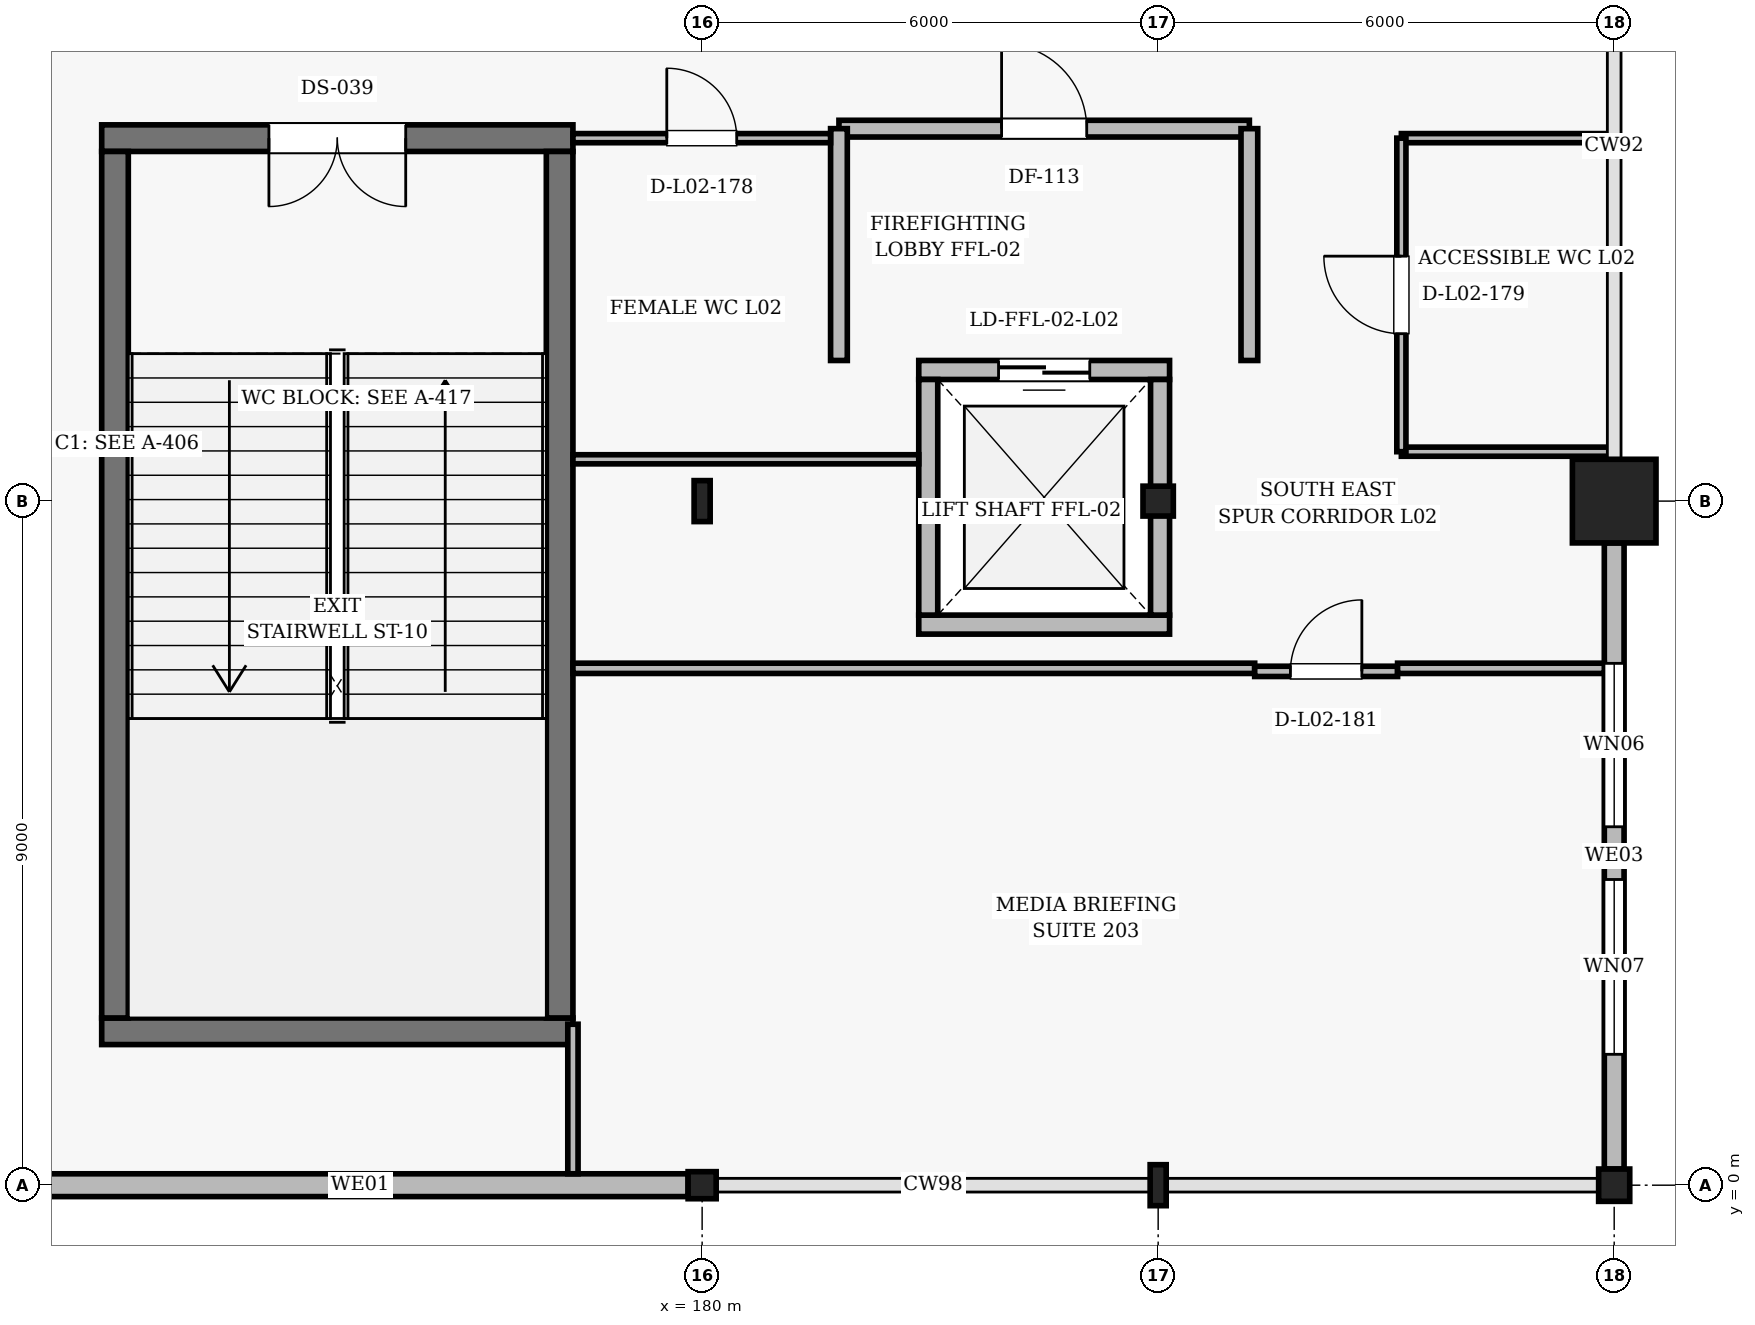
"""IFC4 building model, lengths in metres.
Left out: names, types, materials, properties, quantities, classifications, styles, units other than length and angle.
Written with IfcOpenShell. Run it as: python <this file> out.ifc"""

import sys

from ifc_helpers import new_model, si_unit, direction, frame, frame_2d, origin, origin_2d, place, context, subcontext, project, spatial, rectangle, i_section, extrude, element, fill, save


model = new_model("IFC4")
c1 = context("Model", 3, precision=1e-05, world=origin(), true_north=direction((0.0, 1.0)))
c2 = subcontext(c1, "Body", "Model", "MODEL_VIEW")
j1 = project(units=[si_unit("LENGTHUNIT", "METRE"), si_unit("PLANEANGLEUNIT", "RADIAN")], contexts=[c1])
p1 = place(None, origin())
s1 = spatial("IfcSite", under=j1, at=p1, CompositionType="ELEMENT")
p2 = place(p1, origin())
s2 = spatial("IfcBuilding", under=s1, at=p2, CompositionType="ELEMENT")
p3 = place(p2, frame((0.0, 0.0, 10.8)))
s3 = spatial("IfcBuildingStorey", under=s2, at=p3, CompositionType="ELEMENT", Elevation=10.8)
p4 = place(p3, frame((180.0, 0.0, 0.0), z_axis=(0.0, 0.0, 1.0), x_axis=(1.0, 0.0, 0.0)))
e1 = element("IfcColumn", 1, at=p4, inside=s3, PredefinedType="COLUMN", context=c2, shape_type="SweptSolid", body=[
    extrude(i_section(OverallWidth=0.369, OverallDepth=0.356, WebThickness=0.011, FlangeThickness=0.018, FilletRadius=0.015, at=origin_2d()), origin(), (0.0, 0.0, 1.0), 4.8),
])
for number, where, z_axis, x_axis in (
    (2, (180.0, 9.0, 0.0), (0.0, 0.0, 1.0), (1.0, 0.0, 0.0)),
    (3, (186.0, 0.0, 0.0), (0.0, 0.0, 1.0), (1.0, 0.0, 0.0)),
):
    element("IfcColumn", number, at=place(p3, frame(where, z_axis=z_axis, x_axis=x_axis)), inside=s3, PredefinedType="COLUMN", context=c2, shape_type="SweptSolid", body=[
        extrude(i_section(OverallWidth=0.211, OverallDepth=0.539, WebThickness=0.012, FlangeThickness=0.019, FilletRadius=0.014, at=origin_2d()), origin(), (0.0, 0.0, 1.0), 4.8),
    ])
p5 = place(p3, frame((186.0, 9.0, 0.0), z_axis=(0.0, 0.0, 1.0), x_axis=(1.0, 0.0, 0.0)))
e4 = element("IfcColumn", 4, at=p5, inside=s3, PredefinedType="COLUMN", context=c2, shape_type="SweptSolid", body=[
    extrude(i_section(OverallWidth=0.399, OverallDepth=0.393, WebThickness=0.023, FlangeThickness=0.037, FilletRadius=0.018, at=origin_2d()), origin(), (0.0, 0.0, 1.0), 4.8),
])
p6 = place(p3, frame((192.0, 0.0, 0.0), z_axis=(0.0, 0.0, 1.0), x_axis=(1.0, 0.0, 0.0)))
e5 = element("IfcColumn", 5, at=p6, inside=s3, PredefinedType="COLUMN", context=c2, shape_type="SweptSolid", body=[
    extrude(i_section(OverallWidth=0.409, OverallDepth=0.425, WebThickness=0.031, FlangeThickness=0.049, FilletRadius=0.02, at=origin_2d()), origin(), (0.0, 0.0, 1.0), 4.8),
])
p7 = place(p3, frame((192.0, 9.0, 0.0), z_axis=(0.0, 0.0, 1.0), x_axis=(1.0, 0.0, 0.0)))
e6 = element("IfcColumn", 6, at=p7, inside=s3, PredefinedType="COLUMN", context=c2, shape_type="SweptSolid", body=[
    extrude(rectangle(XDim=1.1, YDim=1.1, at=origin_2d()), origin(), (0.0, 0.0, 1.0), 4.8),
])
p8 = place(p3, frame((192.0, 8.45, 0.0), z_axis=(0.0, 0.0, 1.0), x_axis=(0.0, -1.0, 0.0)))
e7 = element("IfcWall", 7, at=p8, inside=s3, PredefinedType="SOLIDWALL", context=c2, shape_type="SweptSolid", body=[
    extrude(rectangle(XDim=8.238, YDim=0.26, at=frame_2d((4.119, 0.0))), origin(), (0.0, 0.0, 1.0), 4.285),
])
p9 = place(p8, frame((1.584, 0.0, 0.95)))
e8 = element("IfcOpeningElement", 8, at=p9, cuts=e7, PredefinedType="OPENING", context=c2, shape_type="SweptSolid", body=[
    extrude(rectangle(XDim=2.15, YDim=1.85, at=frame_2d((1.075, 0.925))), frame((0.0, 0.14, 0.0), z_axis=(0.0, -1.0, 0.0), x_axis=(1.0, 0.0, 0.0)), (0.0, 0.0, 1.0), 0.28),
])
p10 = place(p8, frame((4.428, 0.0, 0.95)))
e9 = element("IfcOpeningElement", 9, at=p10, cuts=e7, PredefinedType="OPENING", context=c2, shape_type="SweptSolid", body=[
    extrude(rectangle(XDim=2.3, YDim=1.9, at=frame_2d((1.15, 0.95))), frame((0.0, 0.14, 0.0), z_axis=(0.0, -1.0, 0.0), x_axis=(1.0, 0.0, 0.0)), (0.0, 0.0, 1.0), 0.28),
])
p11 = place(p3, frame((179.815, 0.0, 0.0), z_axis=(0.0, 0.0, 1.0), x_axis=(-1.0, 0.0, 0.0)))
e10 = element("IfcWall", 10, at=p11, inside=s3, PredefinedType="SOLIDWALL", context=c2, shape_type="SweptSolid", body=[
    extrude(rectangle(XDim=8.628, YDim=0.3, at=frame_2d((4.314, 0.0))), origin(), (0.0, 0.0, 1.0), 4.119),
])
p12 = place(p3, frame((172.1, 2.025, 0.0), z_axis=(0.0, 0.0, 1.0), x_axis=(1.0, 0.0, 0.0)))
e11 = element("IfcWall", 11, at=p12, inside=s3, PredefinedType="SHEAR", context=c2, shape_type="SweptSolid", body=[
    extrude(rectangle(XDim=6.2, YDim=0.35, at=frame_2d((3.1, 0.0))), origin(), (0.0, 0.0, 1.0), 4.6),
])
p13 = place(p3, frame((178.3, 13.775, 0.0), z_axis=(0.0, 0.0, 1.0), x_axis=(-1.0, 0.0, 0.0)))
e12 = element("IfcWall", 12, at=p13, inside=s3, PredefinedType="SHEAR", context=c2, shape_type="SweptSolid", body=[
    extrude(rectangle(XDim=6.2, YDim=0.35, at=frame_2d((3.1, 0.0))), origin(), (0.0, 0.0, 1.0), 4.6),
])
p14 = place(p13, frame((2.2, 0.0, 0.0)))
e13 = element("IfcOpeningElement", 13, at=p14, cuts=e12, PredefinedType="OPENING", context=c2, shape_type="SweptSolid", body=[
    extrude(rectangle(XDim=1.8, YDim=2.2, at=frame_2d((0.9, 1.1))), frame((0.0, 0.185, 0.0), z_axis=(0.0, -1.0, 0.0), x_axis=(1.0, 0.0, 0.0)), (0.0, 0.0, 1.0), 0.37),
])
for number, where, z_axis, x_axis in (
    (14, (172.275, 13.6, 0.0), (0.0, 0.0, 1.0), (0.0, -1.0, 0.0)),
    (15, (178.125, 2.2, 0.0), (0.0, 0.0, 1.0), (0.0, 1.0, 0.0)),
):
    element("IfcWall", number, at=place(p3, frame(where, z_axis=z_axis, x_axis=x_axis)), inside=s3, PredefinedType="SHEAR", context=c2, shape_type="SweptSolid", body=[
        extrude(rectangle(XDim=11.4, YDim=0.35, at=frame_2d((5.7, 0.0))), origin(), (0.0, 0.0, 1.0), 4.6),
    ])
p15 = place(p3, frame((182.85, 7.375, 0.0), z_axis=(0.0, 0.0, 1.0), x_axis=(1.0, 0.0, 0.0)))
e16 = element("IfcWall", 16, at=p15, inside=s3, PredefinedType="SOLIDWALL", context=c2, shape_type="SweptSolid", body=[
    extrude(rectangle(XDim=3.3, YDim=0.25, at=frame_2d((1.65, 0.0))), origin(), (0.0, 0.0, 1.0), 4.6),
])
p16 = place(p3, frame((186.15, 10.725, 0.0), z_axis=(0.0, 0.0, 1.0), x_axis=(-1.0, 0.0, 0.0)))
e17 = element("IfcWall", 17, at=p16, inside=s3, PredefinedType="SOLIDWALL", context=c2, shape_type="SweptSolid", body=[
    extrude(rectangle(XDim=3.3, YDim=0.25, at=frame_2d((1.65, 0.0))), origin(), (0.0, 0.0, 1.0), 4.6),
])
p17 = place(p16, frame((1.05, 0.0, 0.0)))
e18 = element("IfcOpeningElement", 18, at=p17, cuts=e17, PredefinedType="OPENING", context=c2, shape_type="SweptSolid", body=[
    extrude(rectangle(XDim=1.2, YDim=2.25, at=frame_2d((0.6, 1.125))), frame((0.0, 0.135, 0.0), z_axis=(0.0, -1.0, 0.0), x_axis=(1.0, 0.0, 0.0)), (0.0, 0.0, 1.0), 0.27),
])
for number, where, z_axis, x_axis in (
    (19, (182.975, 10.6, 0.0), (0.0, 0.0, 1.0), (0.0, -1.0, 0.0)),
    (20, (186.025, 7.5, 0.0), (0.0, 0.0, 1.0), (0.0, 1.0, 0.0)),
):
    element("IfcWall", number, at=place(p3, frame(where, z_axis=z_axis, x_axis=x_axis)), inside=s3, PredefinedType="SOLIDWALL", context=c2, shape_type="SweptSolid", body=[
        extrude(rectangle(XDim=3.1, YDim=0.25, at=frame_2d((1.55, 0.0))), origin(), (0.0, 0.0, 1.0), 4.6),
    ])
p18 = place(p3, frame((181.8, 13.9, 0.0), z_axis=(0.0, 0.0, 1.0), x_axis=(1.0, 0.0, 0.0)))
e21 = element("IfcWall", 21, at=p18, inside=s3, PredefinedType="SOLIDWALL", context=c2, shape_type="SweptSolid", body=[
    extrude(rectangle(XDim=5.4, YDim=0.22, at=frame_2d((2.7, 0.0))), origin(), (0.0, 0.0, 1.0), 4.6),
])
p19 = place(p18, frame((2.14, 0.0, 0.0)))
e22 = element("IfcOpeningElement", 22, at=p19, cuts=e21, PredefinedType="OPENING", context=c2, shape_type="SweptSolid", body=[
    extrude(rectangle(XDim=1.12, YDim=2.2, at=frame_2d((0.56, 1.1))), frame((0.0, 0.12, 0.0), z_axis=(0.0, -1.0, 0.0), x_axis=(1.0, 0.0, 0.0)), (0.0, 0.0, 1.0), 0.24),
])
for number, where, z_axis, x_axis in (
    (23, (181.8, 10.85, 0.0), (0.0, 0.0, 1.0), (0.0, 1.0, 0.0)),
    (24, (187.2, 10.85, 0.0), (0.0, 0.0, 1.0), (0.0, 1.0, 0.0)),
):
    element("IfcWall", number, at=place(p3, frame(where, z_axis=z_axis, x_axis=x_axis)), inside=s3, PredefinedType="SOLIDWALL", context=c2, shape_type="SweptSolid", body=[
        extrude(rectangle(XDim=3.05, YDim=0.22, at=frame_2d((1.525, 0.0))), origin(), (0.0, 0.0, 1.0), 4.6),
    ])
p20 = place(p3, frame((178.3, 13.775, 0.0), z_axis=(0.0, 0.0, 1.0), x_axis=(1.0, 0.0, 0.0)))
e25 = element("IfcWall", 25, at=p20, inside=s3, PredefinedType="PARTITIONING", context=c2, shape_type="SweptSolid", body=[
    extrude(rectangle(XDim=3.39, YDim=0.12, at=frame_2d((1.695, 0.0))), origin(), (0.0, 0.0, 1.0), 3.812),
])
p21 = place(p20, frame((1.235, 0.0, 0.0)))
e26 = element("IfcOpeningElement", 26, at=p21, cuts=e25, PredefinedType="OPENING", context=c2, shape_type="SweptSolid", body=[
    extrude(rectangle(XDim=0.92, YDim=2.12, at=frame_2d((0.46, 1.06))), frame((0.0, 0.07, 0.0), z_axis=(0.0, -1.0, 0.0), x_axis=(1.0, 0.0, 0.0)), (0.0, 0.0, 1.0), 0.14),
])
p22 = place(p3, frame((182.85, 9.55, 0.0), z_axis=(0.0, 0.0, 1.0), x_axis=(-1.0, 0.0, 0.0)))
e27 = element("IfcWall", 27, at=p22, inside=s3, PredefinedType="PARTITIONING", context=c2, shape_type="SweptSolid", body=[
    extrude(rectangle(XDim=4.55, YDim=0.12, at=frame_2d((2.275, 0.0))), origin(), (0.0, 0.0, 1.0), 3.812),
])
for number, where, z_axis, x_axis in (
    (28, (189.2, 13.775, 0.0), (0.0, 0.0, 1.0), (1.0, 0.0, 0.0)),
    (29, (191.988, 9.65, 0.0), (0.0, 0.0, 1.0), (-1.0, 0.0, 0.0)),
):
    element("IfcWall", number, at=place(p3, frame(where, z_axis=z_axis, x_axis=x_axis)), inside=s3, PredefinedType="PARTITIONING", context=c2, shape_type="SweptSolid", body=[
        extrude(rectangle(XDim=2.788, YDim=0.12, at=frame_2d((1.394, 0.0))), origin(), (0.0, 0.0, 1.0), 4.046),
    ])
p23 = place(p3, frame((189.2, 9.65, 0.0), z_axis=(0.0, 0.0, 1.0), x_axis=(0.0, 1.0, 0.0)))
e30 = element("IfcWall", 30, at=p23, inside=s3, PredefinedType="PARTITIONING", context=c2, shape_type="SweptSolid", body=[
    extrude(rectangle(XDim=4.125, YDim=0.12, at=frame_2d((2.062, 0.0))), origin(), (0.0, 0.0, 1.0), 4.6),
])
p24 = place(p23, frame((1.552, 0.0, 0.0)))
e31 = element("IfcOpeningElement", 31, at=p24, cuts=e30, PredefinedType="OPENING", context=c2, shape_type="SweptSolid", body=[
    extrude(rectangle(XDim=1.02, YDim=2.16, at=frame_2d((0.51, 1.08))), frame((0.0, 0.07, 0.0), z_axis=(0.0, -1.0, 0.0), x_axis=(1.0, 0.0, 0.0)), (0.0, 0.0, 1.0), 0.14),
])
p25 = place(p3, frame((178.3, 6.8, 0.0), z_axis=(0.0, 0.0, 1.0), x_axis=(1.0, 0.0, 0.0)))
e32 = element("IfcWall", 32, at=p25, inside=s3, PredefinedType="PARTITIONING", context=c2, shape_type="SweptSolid", body=[
    extrude(rectangle(XDim=8.97, YDim=0.135, at=frame_2d((4.485, 0.0))), origin(), (0.0, 0.0, 1.0), 3.89),
])
p26 = place(p3, frame((187.27, 6.76, 0.0), z_axis=(0.0, 0.0, 1.0), x_axis=(1.0, 0.0, 0.0)))
e33 = element("IfcWall", 33, at=p26, inside=s3, PredefinedType="PARTITIONING", context=c2, shape_type="SweptSolid", body=[
    extrude(rectangle(XDim=1.88, YDim=0.135, at=frame_2d((0.94, 0.0))), origin(), (0.0, 0.0, 1.0), 4.6),
])
p27 = place(p26, frame((0.47, 0.0, 0.0)))
e34 = element("IfcOpeningElement", 34, at=p27, cuts=e33, PredefinedType="OPENING", context=c2, shape_type="SweptSolid", body=[
    extrude(rectangle(XDim=0.94, YDim=2.15, at=frame_2d((0.47, 1.075))), frame((0.0, 0.078, 0.0), z_axis=(0.0, -1.0, 0.0), x_axis=(1.0, 0.0, 0.0)), (0.0, 0.0, 1.0), 0.155),
])
p28 = place(p3, frame((189.15, 6.8, 0.0), z_axis=(0.0, 0.0, 1.0), x_axis=(1.0, 0.0, 0.0)))
e35 = element("IfcWall", 35, at=p28, inside=s3, PredefinedType="PARTITIONING", context=c2, shape_type="SweptSolid", body=[
    extrude(rectangle(XDim=2.72, YDim=0.135, at=frame_2d((1.36, 0.0))), origin(), (0.0, 0.0, 1.0), 4.285),
])
p29 = place(p3, frame((178.3, 0.15, 0.0), z_axis=(0.0, 0.0, 1.0), x_axis=(0.0, 1.0, 0.0)))
e36 = element("IfcWall", 36, at=p29, inside=s3, PredefinedType="PARTITIONING", context=c2, shape_type="SweptSolid", body=[
    extrude(rectangle(XDim=1.968, YDim=0.135, at=frame_2d((0.984, 0.0))), origin(), (0.0, 0.0, 1.0), 4.119),
])
p30 = place(p9, origin())
e37 = element("IfcWindow", 37, at=p30, inside=s3, PartitioningType="SINGLE_PANEL", PredefinedType="WINDOW", context=c2, shape_type="SweptSolid", body=[
    extrude(rectangle(XDim=2.15, YDim=1.85, at=frame_2d((1.075, 0.925))), frame((0.0, 0.03, 0.0), z_axis=(0.0, -1.0, 0.0), x_axis=(1.0, 0.0, 0.0)), (0.0, 0.0, 1.0), 0.06),
])
fill(e8, e37)
p31 = place(p10, origin())
e38 = element("IfcWindow", 38, at=p31, inside=s3, PartitioningType="SINGLE_PANEL", PredefinedType="WINDOW", context=c2, shape_type="SweptSolid", body=[
    extrude(rectangle(XDim=2.3, YDim=1.9, at=frame_2d((1.15, 0.95))), frame((0.0, 0.03, 0.0), z_axis=(0.0, -1.0, 0.0), x_axis=(1.0, 0.0, 0.0)), (0.0, 0.0, 1.0), 0.06),
])
fill(e9, e38)
p32 = place(p14, origin())
e39 = element("IfcDoor", 39, at=p32, inside=s3, OperationType="DOUBLE_DOOR_SINGLE_SWING", PredefinedType="DOOR", context=c2, shape_type="SweptSolid", body=[
    extrude(rectangle(XDim=1.8, YDim=2.2, at=frame_2d((0.9, 1.1))), frame((0.0, 0.025, 0.0), z_axis=(0.0, -1.0, 0.0), x_axis=(1.0, 0.0, 0.0)), (0.0, 0.0, 1.0), 0.05),
])
fill(e13, e39)
p33 = place(p17, origin())
e40 = element("IfcDoor", 40, at=p33, inside=s3, OperationType="DOUBLE_DOOR_SLIDING", PredefinedType="DOOR", context=c2, shape_type="SweptSolid", body=[
    extrude(rectangle(XDim=1.2, YDim=2.25, at=frame_2d((0.6, 1.125))), frame((0.0, 0.025, 0.0), z_axis=(0.0, -1.0, 0.0), x_axis=(1.0, 0.0, 0.0)), (0.0, 0.0, 1.0), 0.05),
])
fill(e18, e40)
p34 = place(p19, origin())
e41 = element("IfcDoor", 41, at=p34, inside=s3, OperationType="SINGLE_SWING_LEFT", PredefinedType="DOOR", context=c2, shape_type="SweptSolid", body=[
    extrude(rectangle(XDim=1.12, YDim=2.2, at=frame_2d((0.56, 1.1))), frame((0.0, 0.025, 0.0), z_axis=(0.0, -1.0, 0.0), x_axis=(1.0, 0.0, 0.0)), (0.0, 0.0, 1.0), 0.05),
])
fill(e22, e41)
p35 = place(p21, origin())
e42 = element("IfcDoor", 42, at=p35, inside=s3, OperationType="SINGLE_SWING_LEFT", PredefinedType="DOOR", context=c2, shape_type="SweptSolid", body=[
    extrude(rectangle(XDim=0.92, YDim=2.12, at=frame_2d((0.46, 1.06))), frame((0.0, 0.025, 0.0), z_axis=(0.0, -1.0, 0.0), x_axis=(1.0, 0.0, 0.0)), (0.0, 0.0, 1.0), 0.05),
])
fill(e26, e42)
p36 = place(p24, origin())
e43 = element("IfcDoor", 43, at=p36, inside=s3, OperationType="SINGLE_SWING_RIGHT", PredefinedType="DOOR", context=c2, shape_type="SweptSolid", body=[
    extrude(rectangle(XDim=1.02, YDim=2.16, at=frame_2d((0.51, 1.08))), frame((0.0, 0.025, 0.0), z_axis=(0.0, -1.0, 0.0), x_axis=(1.0, 0.0, 0.0)), (0.0, 0.0, 1.0), 0.05),
])
fill(e31, e43)
p37 = place(p27, origin())
e44 = element("IfcDoor", 44, at=p37, inside=s3, OperationType="SINGLE_SWING_RIGHT", PredefinedType="DOOR", context=c2, shape_type="SweptSolid", body=[
    extrude(rectangle(XDim=0.94, YDim=2.15, at=frame_2d((0.47, 1.075))), frame((0.0, 0.025, 0.0), z_axis=(0.0, -1.0, 0.0), x_axis=(1.0, 0.0, 0.0)), (0.0, 0.0, 1.0), 0.05),
])
fill(e34, e44)
save(model, sys.argv[1])
